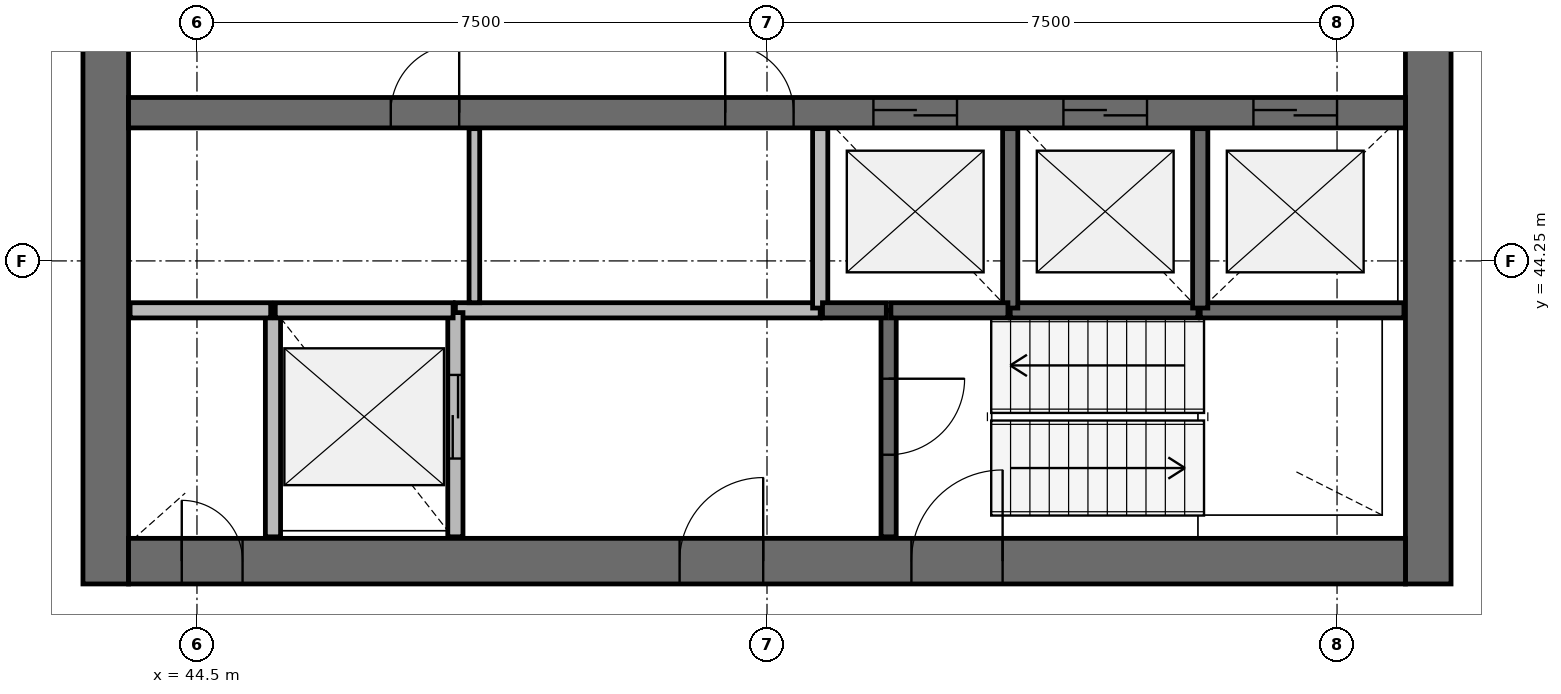
"""IFC4 building model, lengths in metres.
Left out: names, types, materials, properties, quantities, classifications, styles, units other than length and angle.
Written with IfcOpenShell. Run it as: python <this file> out.ifc"""

import sys

from ifc_helpers import new_model, si_unit, direction, frame, frame_2d, origin, place, context, subcontext, project, spatial, rectangle, extrude, source, transform, mapped, element, fill, save


model = new_model("IFC4")
c1 = context("Model", 3, precision=1e-05, world=origin(), true_north=direction((0.0, 1.0)))
c2 = subcontext(c1, "Body", "Model", "MODEL_VIEW")
j1 = project(units=[si_unit("LENGTHUNIT", "METRE"), si_unit("PLANEANGLEUNIT", "RADIAN")], contexts=[c1])
p1 = place(None, origin())
s1 = spatial("IfcSite", under=j1, at=p1, CompositionType="ELEMENT")
p2 = place(p1, origin())
s2 = spatial("IfcBuilding", under=s1, at=p2, CompositionType="ELEMENT")
p3 = place(p2, frame((0.0, 0.0, 261.8)))
s3 = spatial("IfcBuildingStorey", under=s2, at=p3, CompositionType="ELEMENT", Elevation=261.8)
p4 = place(p3, frame((60.7, 40.0, 0.0), z_axis=(0.0, 0.0, 1.0), x_axis=(0.0, 1.0, 0.0)))
e1 = element("IfcWall", 1, at=p4, inside=s3, PredefinedType="SHEAR", context=c2, shape_type="SweptSolid", body=[
    extrude(rectangle(XDim=16.0, YDim=0.6, at=frame_2d((8.0, 0.0))), origin(), (0.0, 0.0, 1.0), 3.9),
])
p5 = place(p4, frame((7.1, 0.0, 0.0)))
e2 = element("IfcOpeningElement", 2, at=p5, cuts=e1, PredefinedType="OPENING", context=c2, shape_type="SweptSolid", body=[
    extrude(rectangle(XDim=1.8, YDim=2.1, at=frame_2d((0.9, 1.05))), frame((0.0, 0.31, 0.0), z_axis=(0.0, -1.0, 0.0), x_axis=(1.0, 0.0, 0.0)), (0.0, 0.0, 1.0), 0.62),
])
p6 = place(p3, frame((43.3, 56.0, 0.0), z_axis=(0.0, 0.0, 1.0), x_axis=(0.0, -1.0, 0.0)))
e3 = element("IfcWall", 3, at=p6, inside=s3, PredefinedType="SHEAR", context=c2, shape_type="SweptSolid", body=[
    extrude(rectangle(XDim=16.0, YDim=0.6, at=frame_2d((8.0, 0.0))), origin(), (0.0, 0.0, 1.0), 3.9),
])
p7 = place(p6, frame((7.1, 0.0, 0.0)))
e4 = element("IfcOpeningElement", 4, at=p7, cuts=e3, PredefinedType="OPENING", context=c2, shape_type="SweptSolid", body=[
    extrude(rectangle(XDim=1.8, YDim=2.1, at=frame_2d((0.9, 1.05))), frame((0.0, 0.31, 0.0), z_axis=(0.0, -1.0, 0.0), x_axis=(1.0, 0.0, 0.0)), (0.0, 0.0, 1.0), 0.62),
])
p8 = place(p3, frame((43.6, 40.3, 0.0), z_axis=(0.0, 0.0, 1.0), x_axis=(1.0, 0.0, 0.0)))
e5 = element("IfcWall", 5, at=p8, inside=s3, PredefinedType="SHEAR", context=c2, shape_type="SweptSolid", body=[
    extrude(rectangle(XDim=16.8, YDim=0.6, at=frame_2d((8.4, 0.0))), origin(), (0.0, 0.0, 1.0), 3.9),
])
p9 = place(p8, frame((10.3, 0.0, 0.0)))
e6 = element("IfcOpeningElement", 6, at=p9, cuts=e5, PredefinedType="OPENING", context=c2, shape_type="SweptSolid", body=[
    extrude(rectangle(XDim=1.2, YDim=2.1, at=frame_2d((0.6, 1.05))), frame((0.0, 0.31, 0.0), z_axis=(0.0, -1.0, 0.0), x_axis=(1.0, 0.0, 0.0)), (0.0, 0.0, 1.0), 0.62),
])
p10 = place(p8, frame((7.25, 0.0, 0.0)))
e7 = element("IfcOpeningElement", 7, at=p10, cuts=e5, PredefinedType="OPENING", context=c2, shape_type="SweptSolid", body=[
    extrude(rectangle(XDim=1.1, YDim=2.1, at=frame_2d((0.55, 1.05))), frame((0.0, 0.31, 0.0), z_axis=(0.0, -1.0, 0.0), x_axis=(1.0, 0.0, 0.0)), (0.0, 0.0, 1.0), 0.62),
])
p11 = place(p8, frame((0.7, 0.0, 0.0)))
e8 = element("IfcOpeningElement", 8, at=p11, cuts=e5, PredefinedType="OPENING", context=c2, shape_type="SweptSolid", body=[
    extrude(rectangle(XDim=0.8, YDim=2.1, at=frame_2d((0.4, 1.05))), frame((0.0, 0.31, 0.0), z_axis=(0.0, -1.0, 0.0), x_axis=(1.0, 0.0, 0.0)), (0.0, 0.0, 1.0), 0.62),
])
p12 = place(p3, frame((43.6, 46.2, 0.0), z_axis=(0.0, 0.0, 1.0), x_axis=(1.0, 0.0, 0.0)))
e9 = element("IfcWall", 9, at=p12, inside=s3, PredefinedType="SHEAR", context=c2, shape_type="SweptSolid", body=[
    extrude(rectangle(XDim=16.8, YDim=0.4, at=frame_2d((8.4, 0.0))), origin(), (0.0, 0.0, 1.0), 3.9),
])
p13 = place(p12, frame((9.8, 0.0, 0.0)))
e10 = element("IfcOpeningElement", 10, at=p13, cuts=e9, PredefinedType="OPENING", context=c2, shape_type="SweptSolid", body=[
    extrude(rectangle(XDim=1.1, YDim=2.1, at=frame_2d((0.55, 1.05))), frame((0.0, 0.21, 0.0), z_axis=(0.0, -1.0, 0.0), x_axis=(1.0, 0.0, 0.0)), (0.0, 0.0, 1.0), 0.42),
])
p14 = place(p12, frame((12.3, 0.0, 0.0)))
e11 = element("IfcOpeningElement", 11, at=p14, cuts=e9, PredefinedType="OPENING", context=c2, shape_type="SweptSolid", body=[
    extrude(rectangle(XDim=1.1, YDim=2.1, at=frame_2d((0.55, 1.05))), frame((0.0, 0.21, 0.0), z_axis=(0.0, -1.0, 0.0), x_axis=(1.0, 0.0, 0.0)), (0.0, 0.0, 1.0), 0.42),
])
p15 = place(p12, frame((14.8, 0.0, 0.0)))
e12 = element("IfcOpeningElement", 12, at=p15, cuts=e9, PredefinedType="OPENING", context=c2, shape_type="SweptSolid", body=[
    extrude(rectangle(XDim=1.1, YDim=2.1, at=frame_2d((0.55, 1.05))), frame((0.0, 0.21, 0.0), z_axis=(0.0, -1.0, 0.0), x_axis=(1.0, 0.0, 0.0)), (0.0, 0.0, 1.0), 0.42),
])
p16 = place(p12, frame((3.45, 0.0, 0.0)))
e13 = element("IfcOpeningElement", 13, at=p16, cuts=e9, PredefinedType="OPENING", context=c2, shape_type="SweptSolid", body=[
    extrude(rectangle(XDim=0.9, YDim=2.1, at=frame_2d((0.45, 1.05))), frame((0.0, 0.21, 0.0), z_axis=(0.0, -1.0, 0.0), x_axis=(1.0, 0.0, 0.0)), (0.0, 0.0, 1.0), 0.42),
])
p17 = place(p12, frame((7.85, 0.0, 0.0)))
e14 = element("IfcOpeningElement", 14, at=p17, cuts=e9, PredefinedType="OPENING", context=c2, shape_type="SweptSolid", body=[
    extrude(rectangle(XDim=0.9, YDim=2.1, at=frame_2d((0.45, 1.05))), frame((0.0, 0.21, 0.0), z_axis=(0.0, -1.0, 0.0), x_axis=(1.0, 0.0, 0.0)), (0.0, 0.0, 1.0), 0.42),
])
p18 = place(p3, frame((52.7, 43.6, 0.0), z_axis=(0.0, 0.0, 1.0), x_axis=(-1.0, 0.0, 0.0)))
e15 = element("IfcWall", 15, at=p18, inside=s3, PredefinedType="SOLIDWALL", context=c2, shape_type="SweptSolid", body=[
    extrude(rectangle(XDim=4.8, YDim=0.2, at=frame_2d((2.4, 0.0))), origin(), (0.0, 0.0, 1.0), 3.45),
])
p19 = place(p3, frame((45.5, 43.6, 0.0), z_axis=(0.0, 0.0, 1.0), x_axis=(0.0, -1.0, 0.0)))
e16 = element("IfcWall", 16, at=p19, inside=s3, PredefinedType="SOLIDWALL", context=c2, shape_type="SweptSolid", body=[
    extrude(rectangle(XDim=2.98, YDim=0.2, at=frame_2d((1.49, 0.0))), origin(), (0.0, 0.0, 1.0), 3.45),
])
p20 = place(p3, frame((47.9, 40.62, 0.0), z_axis=(0.0, 0.0, 1.0), x_axis=(0.0, 1.0, 0.0)))
e17 = element("IfcWall", 17, at=p20, inside=s3, PredefinedType="SOLIDWALL", context=c2, shape_type="SweptSolid", body=[
    extrude(rectangle(XDim=2.95, YDim=0.2, at=frame_2d((1.475, 0.0))), origin(), (0.0, 0.0, 1.0), 3.45),
])
p21 = place(p20, frame((1.03, 0.0, 0.0)))
e18 = element("IfcOpeningElement", 18, at=p21, cuts=e17, PredefinedType="OPENING", context=c2, shape_type="SweptSolid", body=[
    extrude(rectangle(XDim=1.1, YDim=2.1, at=frame_2d((0.55, 1.05))), frame((0.0, 0.11, 0.0), z_axis=(0.0, -1.0, 0.0), x_axis=(1.0, 0.0, 0.0)), (0.0, 0.0, 1.0), 0.22),
])
p22 = place(p3, frame((53.6, 43.6, 0.0), z_axis=(0.0, 0.0, 1.0), x_axis=(0.0, -1.0, 0.0)))
e19 = element("IfcWall", 19, at=p22, inside=s3, PredefinedType="SOLIDWALL", context=c2, shape_type="SweptSolid", body=[
    extrude(rectangle(XDim=2.98, YDim=0.2, at=frame_2d((1.49, 0.0))), origin(), (0.0, 0.0, 1.0), 3.45),
])
p23 = place(p22, frame((0.9, 0.0, 0.0)))
e20 = element("IfcOpeningElement", 20, at=p23, cuts=e19, PredefinedType="OPENING", context=c2, shape_type="SweptSolid", body=[
    extrude(rectangle(XDim=1.0, YDim=2.1, at=frame_2d((0.5, 1.05))), frame((0.0, 0.11, 0.0), z_axis=(0.0, -1.0, 0.0), x_axis=(1.0, 0.0, 0.0)), (0.0, 0.0, 1.0), 0.22),
])
p24 = place(p3, frame((57.7, 43.6, 0.0), z_axis=(0.0, 0.0, 1.0), x_axis=(1.0, 0.0, 0.0)))
e21 = element("IfcWall", 21, at=p24, inside=s3, PredefinedType="SOLIDWALL", context=c2, shape_type="SweptSolid", body=[
    extrude(rectangle(XDim=2.68, YDim=0.2, at=frame_2d((1.34, 0.0))), origin(), (0.0, 0.0, 1.0), 3.45),
])
p25 = place(p3, frame((55.2, 43.6, 0.0), z_axis=(0.0, 0.0, 1.0), x_axis=(1.0, 0.0, 0.0)))
e22 = element("IfcWall", 22, at=p25, inside=s3, PredefinedType="SOLIDWALL", context=c2, shape_type="SweptSolid", body=[
    extrude(rectangle(XDim=2.47, YDim=0.2, at=frame_2d((1.235, 0.0))), origin(), (0.0, 0.0, 1.0), 3.45),
])
p26 = place(p3, frame((47.87, 43.6, 0.0), z_axis=(0.0, 0.0, 1.0), x_axis=(-1.0, 0.0, 0.0)))
e23 = element("IfcWall", 23, at=p26, inside=s3, PredefinedType="SOLIDWALL", context=c2, shape_type="SweptSolid", body=[
    extrude(rectangle(XDim=2.34, YDim=0.2, at=frame_2d((1.17, 0.0))), origin(), (0.0, 0.0, 1.0), 3.45),
])
for number, where, z_axis, x_axis in (
    (24, (52.7, 45.99, 0.0), (0.0, 0.0, 1.0), (0.0, -1.0, 0.0)),
    (25, (55.2, 43.63, 0.0), (0.0, 0.0, 1.0), (0.0, 1.0, 0.0)),
    (26, (57.7, 43.63, 0.0), (0.0, 0.0, 1.0), (0.0, 1.0, 0.0)),
):
    element("IfcWall", number, at=place(p3, frame(where, z_axis=z_axis, x_axis=x_axis)), inside=s3, PredefinedType="SOLIDWALL", context=c2, shape_type="SweptSolid", body=[
        extrude(rectangle(XDim=2.36, YDim=0.2, at=frame_2d((1.18, 0.0))), origin(), (0.0, 0.0, 1.0), 3.45),
    ])
p27 = place(p3, frame((45.47, 43.6, 0.0), z_axis=(0.0, 0.0, 1.0), x_axis=(-1.0, 0.0, 0.0)))
e27 = element("IfcWall", 27, at=p27, inside=s3, PredefinedType="SOLIDWALL", context=c2, shape_type="SweptSolid", body=[
    extrude(rectangle(XDim=1.85, YDim=0.2, at=frame_2d((0.925, 0.0))), origin(), (0.0, 0.0, 1.0), 3.45),
])
p28 = place(p3, frame((53.63, 43.6, 0.0), z_axis=(0.0, 0.0, 1.0), x_axis=(1.0, 0.0, 0.0)))
e28 = element("IfcWall", 28, at=p28, inside=s3, PredefinedType="SOLIDWALL", context=c2, shape_type="SweptSolid", body=[
    extrude(rectangle(XDim=1.54, YDim=0.2, at=frame_2d((0.77, 0.0))), origin(), (0.0, 0.0, 1.0), 3.45),
])
p29 = place(p3, frame((52.73, 43.6, 0.0), z_axis=(0.0, 0.0, 1.0), x_axis=(1.0, 0.0, 0.0)))
e29 = element("IfcWall", 29, at=p29, inside=s3, PredefinedType="SOLIDWALL", context=c2, shape_type="SweptSolid", body=[
    extrude(rectangle(XDim=0.84, YDim=0.2, at=frame_2d((0.42, 0.0))), origin(), (0.0, 0.0, 1.0), 3.45),
])
p30 = place(p3, frame((48.15, 43.7, 0.0), z_axis=(0.0, 0.0, 1.0), x_axis=(0.0, 1.0, 0.0)))
e30 = element("IfcWall", 30, at=p30, inside=s3, PredefinedType="PARTITIONING", context=c2, shape_type="SweptSolid", body=[
    extrude(rectangle(XDim=2.29, YDim=0.14, at=frame_2d((1.145, 0.0))), origin(), (0.0, 0.0, 1.0), 2.75),
])
m1 = source(origin(), c2, "Body", "SweptSolid", [
    extrude(rectangle(XDim=1.1, YDim=2.1, at=frame_2d((0.55, 1.05))), frame((0.0, 0.025, 0.0), z_axis=(0.0, -1.0, 0.0), x_axis=(1.0, 0.0, 0.0)), (0.0, 0.0, 1.0), 0.05),
])
p31 = place(p13, origin())
e31 = element("IfcDoor", 31, at=p31, inside=s3, OperationType="DOUBLE_DOOR_SLIDING", PredefinedType="USERDEFINED", context=c2, shape_type="MappedRepresentation", body=[
    mapped(m1, transform((0.0, 0.0, 0.0), scale=1.0)),
])
fill(e10, e31)
p32 = place(p14, origin())
e32 = element("IfcDoor", 32, at=p32, inside=s3, OperationType="DOUBLE_DOOR_SLIDING", PredefinedType="USERDEFINED", context=c2, shape_type="MappedRepresentation", body=[
    mapped(m1, transform((0.0, 0.0, 0.0), scale=1.0)),
])
fill(e11, e32)
p33 = place(p15, origin())
e33 = element("IfcDoor", 33, at=p33, inside=s3, OperationType="DOUBLE_DOOR_SLIDING", PredefinedType="USERDEFINED", context=c2, shape_type="MappedRepresentation", body=[
    mapped(m1, transform((0.0, 0.0, 0.0), scale=1.0)),
])
fill(e12, e33)
p34 = place(p21, origin())
e34 = element("IfcDoor", 34, at=p34, inside=s3, OperationType="DOUBLE_DOOR_SLIDING", PredefinedType="USERDEFINED", context=c2, shape_type="MappedRepresentation", body=[
    mapped(m1, transform((0.0, 0.0, 0.0), scale=1.0)),
])
fill(e18, e34)
m2 = source(origin(), c2, "Body", "SweptSolid", [
    extrude(rectangle(XDim=1.2, YDim=2.1, at=frame_2d((0.6, 1.05))), frame((0.0, 0.025, 0.0), z_axis=(0.0, -1.0, 0.0), x_axis=(1.0, 0.0, 0.0)), (0.0, 0.0, 1.0), 0.05),
])
p35 = place(p9, origin())
e35 = element("IfcDoor", 35, at=p35, inside=s3, OperationType="SINGLE_SWING_RIGHT", PredefinedType="DOOR", context=c2, shape_type="MappedRepresentation", body=[
    mapped(m2, transform((0.0, 0.0, 0.0), scale=1.0)),
])
fill(e6, e35)
m3 = source(origin(), c2, "Body", "SweptSolid", [
    extrude(rectangle(XDim=1.0, YDim=2.1, at=frame_2d((0.5, 1.05))), frame((0.0, 0.025, 0.0), z_axis=(0.0, -1.0, 0.0), x_axis=(1.0, 0.0, 0.0)), (0.0, 0.0, 1.0), 0.05),
])
p36 = place(p23, origin())
e36 = element("IfcDoor", 36, at=p36, inside=s3, OperationType="SINGLE_SWING_LEFT", PredefinedType="DOOR", context=c2, shape_type="MappedRepresentation", body=[
    mapped(m3, transform((0.0, 0.0, 0.0), scale=1.0)),
])
fill(e20, e36)
m4 = source(origin(), c2, "Body", "SweptSolid", [
    extrude(rectangle(XDim=1.1, YDim=2.1, at=frame_2d((0.55, 1.05))), frame((0.0, 0.025, 0.0), z_axis=(0.0, -1.0, 0.0), x_axis=(1.0, 0.0, 0.0)), (0.0, 0.0, 1.0), 0.05),
])
p37 = place(p10, origin())
e37 = element("IfcDoor", 37, at=p37, inside=s3, OperationType="SINGLE_SWING_RIGHT", PredefinedType="DOOR", context=c2, shape_type="MappedRepresentation", body=[
    mapped(m4, transform((0.0, 0.0, 0.0), scale=1.0)),
])
fill(e7, e37)
m5 = source(origin(), c2, "Body", "SweptSolid", [
    extrude(rectangle(XDim=0.8, YDim=2.1, at=frame_2d((0.4, 1.05))), frame((0.0, 0.025, 0.0), z_axis=(0.0, -1.0, 0.0), x_axis=(1.0, 0.0, 0.0)), (0.0, 0.0, 1.0), 0.05),
])
p38 = place(p11, origin())
e38 = element("IfcDoor", 38, at=p38, inside=s3, OperationType="SINGLE_SWING_LEFT", PredefinedType="DOOR", context=c2, shape_type="MappedRepresentation", body=[
    mapped(m5, transform((0.0, 0.0, 0.0), scale=1.0)),
])
fill(e8, e38)
m6 = source(origin(), c2, "Body", "SweptSolid", [
    extrude(rectangle(XDim=0.9, YDim=2.1, at=frame_2d((0.45, 1.05))), frame((0.0, 0.025, 0.0), z_axis=(0.0, -1.0, 0.0), x_axis=(1.0, 0.0, 0.0)), (0.0, 0.0, 1.0), 0.05),
])
p39 = place(p16, origin())
e39 = element("IfcDoor", 39, at=p39, inside=s3, OperationType="SINGLE_SWING_RIGHT", PredefinedType="DOOR", context=c2, shape_type="MappedRepresentation", body=[
    mapped(m6, transform((0.0, 0.0, 0.0), scale=1.0)),
])
fill(e13, e39)
p40 = place(p17, origin())
e40 = element("IfcDoor", 40, at=p40, inside=s3, OperationType="SINGLE_SWING_LEFT", PredefinedType="DOOR", context=c2, shape_type="MappedRepresentation", body=[
    mapped(m6, transform((0.0, 0.0, 0.0), scale=1.0)),
])
fill(e14, e40)
save(model, sys.argv[1])
